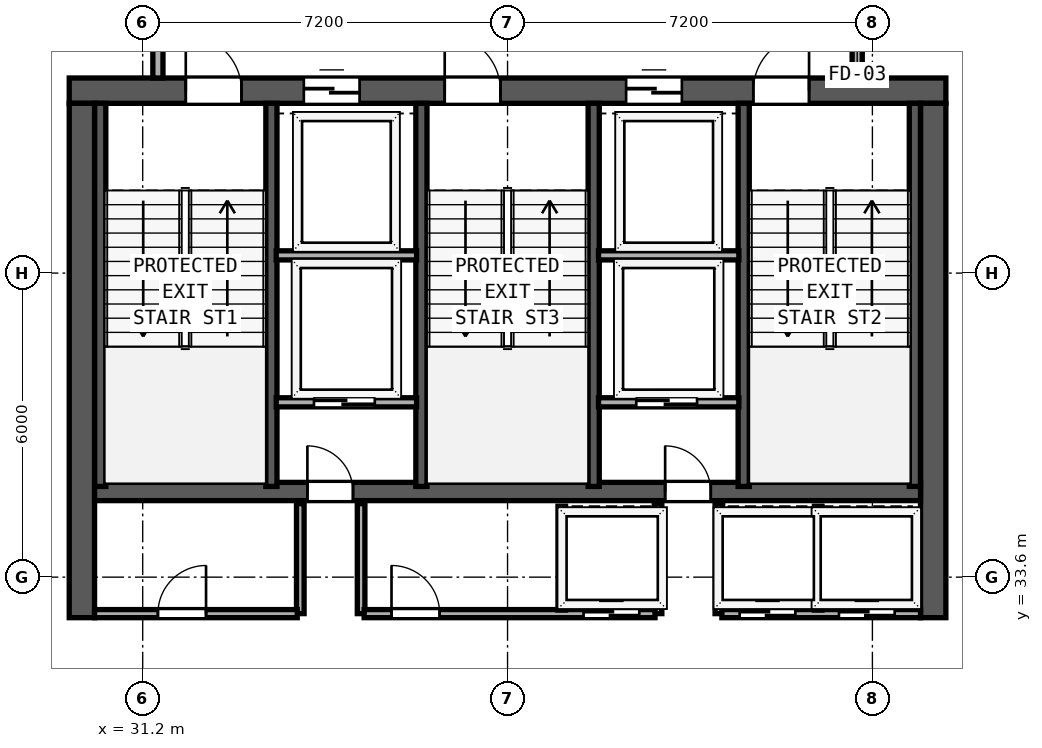
"""IFC4 building model, lengths in metres.
Left out: names, types, materials, properties, quantities, classifications, styles, units other than length and angle.
Written with IfcOpenShell. Run it as: python <this file> out.ifc"""

import sys

from ifc_helpers import new_model, si_unit, direction, frame, frame_2d, origin, place, context, subcontext, project, spatial, rectangle, extrude, element, fill, save


model = new_model("IFC4")
c1 = context("Model", 3, precision=1e-05, world=origin(), true_north=direction((0.0, 1.0)))
c2 = subcontext(c1, "Body", "Model", "MODEL_VIEW")
j1 = project(units=[si_unit("LENGTHUNIT", "METRE"), si_unit("PLANEANGLEUNIT", "RADIAN")], contexts=[c1])
p1 = place(None, origin())
s1 = spatial("IfcSite", under=j1, at=p1, CompositionType="ELEMENT")
p2 = place(p1, origin())
s2 = spatial("IfcBuilding", under=s1, at=p2, CompositionType="ELEMENT")
p3 = place(p2, frame((0.0, 0.0, 309.5)))
s3 = spatial("IfcBuildingStorey", under=s2, at=p3, CompositionType="ELEMENT", Elevation=309.5)
p4 = place(p3, frame((29.75, 43.2, 0.0), z_axis=(0.0, 0.0, 1.0), x_axis=(1.0, 0.0, 0.0)))
e1 = element("IfcWall", 1, at=p4, inside=s3, PredefinedType="SHEAR", context=c2, shape_type="SweptSolid", body=[
    extrude(rectangle(XDim=17.3, YDim=0.5, at=frame_2d((8.65, 0.0))), origin(), (0.0, 0.0, 1.0), 3.66),
])
p5 = place(p4, frame((2.3, 0.0, 0.0)))
e2 = element("IfcOpeningElement", 2, at=p5, cuts=e1, PredefinedType="OPENING", context=c2, shape_type="SweptSolid", body=[
    extrude(rectangle(XDim=1.1, YDim=2.15, at=frame_2d((0.55, 1.075))), frame((0.0, 0.26, 0.0), z_axis=(0.0, -1.0, 0.0), x_axis=(1.0, 0.0, 0.0)), (0.0, 0.0, 1.0), 0.52),
])
p6 = place(p4, frame((7.41, 0.0, 0.0)))
e3 = element("IfcOpeningElement", 3, at=p6, cuts=e1, PredefinedType="OPENING", context=c2, shape_type="SweptSolid", body=[
    extrude(rectangle(XDim=1.1, YDim=2.15, at=frame_2d((0.55, 1.075))), frame((0.0, 0.26, 0.0), z_axis=(0.0, -1.0, 0.0), x_axis=(1.0, 0.0, 0.0)), (0.0, 0.0, 1.0), 0.52),
])
p7 = place(p4, frame((13.5, 0.0, 0.0)))
e4 = element("IfcOpeningElement", 4, at=p7, cuts=e1, PredefinedType="OPENING", context=c2, shape_type="SweptSolid", body=[
    extrude(rectangle(XDim=1.1, YDim=2.15, at=frame_2d((0.55, 1.075))), frame((0.0, 0.26, 0.0), z_axis=(0.0, -1.0, 0.0), x_axis=(1.0, 0.0, 0.0)), (0.0, 0.0, 1.0), 0.52),
])
p8 = place(p4, frame((4.63, 0.0, 0.0)))
e5 = element("IfcOpeningElement", 5, at=p8, cuts=e1, PredefinedType="OPENING", context=c2, shape_type="SweptSolid", body=[
    extrude(rectangle(XDim=1.1, YDim=2.2, at=frame_2d((0.55, 1.1))), frame((0.0, 0.26, 0.0), z_axis=(0.0, -1.0, 0.0), x_axis=(1.0, 0.0, 0.0)), (0.0, 0.0, 1.0), 0.52),
])
p9 = place(p4, frame((10.99, 0.0, 0.0)))
e6 = element("IfcOpeningElement", 6, at=p9, cuts=e1, PredefinedType="OPENING", context=c2, shape_type="SweptSolid", body=[
    extrude(rectangle(XDim=1.1, YDim=2.2, at=frame_2d((0.55, 1.1))), frame((0.0, 0.26, 0.0), z_axis=(0.0, -1.0, 0.0), x_axis=(1.0, 0.0, 0.0)), (0.0, 0.0, 1.0), 0.52),
])
for number, where, z_axis, x_axis in (
    (7, (30.0, 32.8, 0.0), (0.0, 0.0, 1.0), (0.0, 1.0, 0.0)),
    (8, (46.8, 32.8, 0.0), (0.0, 0.0, 1.0), (0.0, 1.0, 0.0)),
):
    element("IfcWall", number, at=place(p3, frame(where, z_axis=z_axis, x_axis=x_axis)), inside=s3, PredefinedType="SHEAR", context=c2, shape_type="SweptSolid", body=[
        extrude(rectangle(XDim=10.15, YDim=0.5, at=frame_2d((5.075, 0.0))), origin(), (0.0, 0.0, 1.0), 3.66),
    ])
p10 = place(p3, frame((30.25, 35.29, 0.0), z_axis=(0.0, 0.0, 1.0), x_axis=(1.0, 0.0, 0.0)))
e9 = element("IfcWall", 9, at=p10, inside=s3, PredefinedType="SHEAR", context=c2, shape_type="SweptSolid", body=[
    extrude(rectangle(XDim=16.3, YDim=0.36, at=frame_2d((8.15, 0.0))), origin(), (0.0, 0.0, 1.0), 3.66),
])
p11 = place(p10, frame((5.1, 0.0, 0.0), z_axis=(0.0, 0.0, 1.0), x_axis=(-1.0, 0.0, 0.0)))
e10 = element("IfcOpeningElement", 10, at=p11, cuts=e9, PredefinedType="OPENING", context=c2, shape_type="SweptSolid", body=[
    extrude(rectangle(XDim=0.9, YDim=2.1, at=frame_2d((0.45, 1.05))), frame((0.0, 0.19, 0.0), z_axis=(0.0, -1.0, 0.0), x_axis=(1.0, 0.0, 0.0)), (0.0, 0.0, 1.0), 0.38),
])
p12 = place(p10, frame((12.16, 0.0, 0.0), z_axis=(0.0, 0.0, 1.0), x_axis=(-1.0, 0.0, 0.0)))
e11 = element("IfcOpeningElement", 11, at=p12, cuts=e9, PredefinedType="OPENING", context=c2, shape_type="SweptSolid", body=[
    extrude(rectangle(XDim=0.9, YDim=2.1, at=frame_2d((0.45, 1.05))), frame((0.0, 0.19, 0.0), z_axis=(0.0, -1.0, 0.0), x_axis=(1.0, 0.0, 0.0)), (0.0, 0.0, 1.0), 0.38),
])
for number, where, z_axis, x_axis in (
    (12, (30.362, 35.39, 0.0), (0.0, 0.0, 1.0), (0.0, 1.0, 0.0)),
    (13, (33.74, 35.39, 0.0), (0.0, 0.0, 1.0), (0.0, 1.0, 0.0)),
    (14, (36.7, 35.39, 0.0), (0.0, 0.0, 1.0), (0.0, 1.0, 0.0)),
    (15, (40.1, 35.39, 0.0), (0.0, 0.0, 1.0), (0.0, 1.0, 0.0)),
    (16, (43.06, 35.39, 0.0), (0.0, 0.0, 1.0), (0.0, 1.0, 0.0)),
    (17, (46.438, 35.39, 0.0), (0.0, 0.0, 1.0), (0.0, 1.0, 0.0)),
):
    element("IfcWall", number, at=place(p3, frame(where, z_axis=z_axis, x_axis=x_axis)), inside=s3, PredefinedType="SHEAR", context=c2, shape_type="SweptSolid", body=[
        extrude(rectangle(XDim=7.56, YDim=0.22, at=frame_2d((3.78, 0.0))), origin(), (0.0, 0.0, 1.0), 3.66),
    ])
p13 = place(p3, frame((31.5, 43.45, 0.0), z_axis=(0.0, 0.0, 1.0), x_axis=(0.0, 1.0, 0.0)))
e18 = element("IfcWall", 18, at=p13, inside=s3, PredefinedType="SOLIDWALL", context=c2, shape_type="SweptSolid", body=[
    extrude(rectangle(XDim=2.445, YDim=0.2, at=frame_2d((1.223, 0.0))), origin(), (0.0, 0.0, 1.0), 3.66),
])
p14 = place(p13, frame((1.8, 0.0, 0.0), z_axis=(0.0, 0.0, 1.0), x_axis=(-1.0, 0.0, 0.0)))
e19 = element("IfcOpeningElement", 19, at=p14, cuts=e18, PredefinedType="OPENING", context=c2, shape_type="SweptSolid", body=[
    extrude(rectangle(XDim=1.1, YDim=2.15, at=frame_2d((0.55, 1.075))), frame((0.0, 0.11, 0.0), z_axis=(0.0, -1.0, 0.0), x_axis=(1.0, 0.0, 0.0)), (0.0, 0.0, 1.0), 0.22),
])
p15 = place(p3, frame((45.3, 43.45, 0.0), z_axis=(0.0, 0.0, 1.0), x_axis=(0.0, 1.0, 0.0)))
e20 = element("IfcWall", 20, at=p15, inside=s3, PredefinedType="SOLIDWALL", context=c2, shape_type="SweptSolid", body=[
    extrude(rectangle(XDim=2.445, YDim=0.2, at=frame_2d((1.223, 0.0))), origin(), (0.0, 0.0, 1.0), 3.66),
])
p16 = place(p15, frame((0.7, 0.0, 0.0)))
e21 = element("IfcOpeningElement", 21, at=p16, cuts=e20, PredefinedType="OPENING", context=c2, shape_type="SweptSolid", body=[
    extrude(rectangle(XDim=1.1, YDim=2.15, at=frame_2d((0.55, 1.075))), frame((0.0, 0.11, 0.0), z_axis=(0.0, -1.0, 0.0), x_axis=(1.0, 0.0, 0.0)), (0.0, 0.0, 1.0), 0.22),
])
for number, where, z_axis, x_axis in (
    (22, (33.835, 39.95, 0.0), (0.0, 0.0, 1.0), (1.0, 0.0, 0.0)),
    (23, (40.195, 39.95, 0.0), (0.0, 0.0, 1.0), (1.0, 0.0, 0.0)),
):
    element("IfcWall", number, at=place(p3, frame(where, z_axis=z_axis, x_axis=x_axis)), inside=s3, PredefinedType="SOLIDWALL", context=c2, shape_type="SweptSolid", body=[
        extrude(rectangle(XDim=2.77, YDim=0.18, at=frame_2d((1.385, 0.0))), origin(), (0.0, 0.0, 1.0), 3.66),
    ])
p17 = place(p3, frame((33.835, 37.05, 0.0), z_axis=(0.0, 0.0, 1.0), x_axis=(1.0, 0.0, 0.0)))
e24 = element("IfcWall", 24, at=p17, inside=s3, PredefinedType="SOLIDWALL", context=c2, shape_type="SweptSolid", body=[
    extrude(rectangle(XDim=2.77, YDim=0.18, at=frame_2d((1.385, 0.0))), origin(), (0.0, 0.0, 1.0), 3.66),
])
p18 = place(p17, frame((1.945, 0.0, 0.0), z_axis=(0.0, 0.0, 1.0), x_axis=(-1.0, 0.0, 0.0)))
e25 = element("IfcOpeningElement", 25, at=p18, cuts=e24, PredefinedType="OPENING", context=c2, shape_type="SweptSolid", body=[
    extrude(rectangle(XDim=1.2, YDim=2.2, at=frame_2d((0.6, 1.1))), frame((0.0, 0.1, 0.0), z_axis=(0.0, -1.0, 0.0), x_axis=(1.0, 0.0, 0.0)), (0.0, 0.0, 1.0), 0.2),
])
for number, where, z_axis, x_axis in (
    (26, (34.31, 32.88, 0.0), (0.0, 0.0, 1.0), (0.0, 1.0, 0.0)),
    (27, (35.51, 32.88, 0.0), (0.0, 0.0, 1.0), (0.0, 1.0, 0.0)),
):
    element("IfcWall", number, at=place(p3, frame(where, z_axis=z_axis, x_axis=x_axis)), inside=s3, PredefinedType="SOLIDWALL", context=c2, shape_type="SweptSolid", body=[
        extrude(rectangle(XDim=2.17, YDim=0.15, at=frame_2d((1.085, 0.0))), origin(), (0.0, 0.0, 1.0), 3.66),
    ])
p19 = place(p3, frame((40.195, 37.05, 0.0), z_axis=(0.0, 0.0, 1.0), x_axis=(1.0, 0.0, 0.0)))
e28 = element("IfcWall", 28, at=p19, inside=s3, PredefinedType="SOLIDWALL", context=c2, shape_type="SweptSolid", body=[
    extrude(rectangle(XDim=2.77, YDim=0.18, at=frame_2d((1.385, 0.0))), origin(), (0.0, 0.0, 1.0), 3.66),
])
p20 = place(p19, frame((1.945, 0.0, 0.0), z_axis=(0.0, 0.0, 1.0), x_axis=(-1.0, 0.0, 0.0)))
e29 = element("IfcOpeningElement", 29, at=p20, cuts=e28, PredefinedType="OPENING", context=c2, shape_type="SweptSolid", body=[
    extrude(rectangle(XDim=1.2, YDim=2.2, at=frame_2d((0.6, 1.1))), frame((0.0, 0.1, 0.0), z_axis=(0.0, -1.0, 0.0), x_axis=(1.0, 0.0, 0.0)), (0.0, 0.0, 1.0), 0.2),
])
for number, where, z_axis, x_axis in (
    (30, (41.37, 32.88, 0.0), (0.0, 0.0, 1.0), (0.0, 1.0, 0.0)),
    (31, (42.57, 32.88, 0.0), (0.0, 0.0, 1.0), (0.0, 1.0, 0.0)),
):
    element("IfcWall", number, at=place(p3, frame(where, z_axis=z_axis, x_axis=x_axis)), inside=s3, PredefinedType="SOLIDWALL", context=c2, shape_type="SweptSolid", body=[
        extrude(rectangle(XDim=2.17, YDim=0.15, at=frame_2d((1.085, 0.0))), origin(), (0.0, 0.0, 1.0), 3.66),
    ])
p21 = place(p3, frame((30.25, 32.88, 0.0), z_axis=(0.0, 0.0, 1.0), x_axis=(1.0, 0.0, 0.0)))
e32 = element("IfcWall", 32, at=p21, inside=s3, PredefinedType="SOLIDWALL", context=c2, shape_type="SweptSolid", body=[
    extrude(rectangle(XDim=4.0, YDim=0.16, at=frame_2d((2.0, 0.0))), origin(), (0.0, 0.0, 1.0), 3.66),
])
p22 = place(p21, frame((2.2, 0.0, 0.0), z_axis=(0.0, 0.0, 1.0), x_axis=(-1.0, 0.0, 0.0)))
e33 = element("IfcOpeningElement", 33, at=p22, cuts=e32, PredefinedType="OPENING", context=c2, shape_type="SweptSolid", body=[
    extrude(rectangle(XDim=0.95, YDim=2.12, at=frame_2d((0.475, 1.06))), frame((0.0, 0.09, 0.0), z_axis=(0.0, -1.0, 0.0), x_axis=(1.0, 0.0, 0.0)), (0.0, 0.0, 1.0), 0.18),
])
p23 = place(p3, frame((35.57, 32.88, 0.0), z_axis=(0.0, 0.0, 1.0), x_axis=(1.0, 0.0, 0.0)))
e34 = element("IfcWall", 34, at=p23, inside=s3, PredefinedType="SOLIDWALL", context=c2, shape_type="SweptSolid", body=[
    extrude(rectangle(XDim=5.74, YDim=0.16, at=frame_2d((2.87, 0.0))), origin(), (0.0, 0.0, 1.0), 3.66),
])
p24 = place(p23, frame((1.49, 0.0, 0.0), z_axis=(0.0, 0.0, 1.0), x_axis=(-1.0, 0.0, 0.0)))
e35 = element("IfcOpeningElement", 35, at=p24, cuts=e34, PredefinedType="OPENING", context=c2, shape_type="SweptSolid", body=[
    extrude(rectangle(XDim=0.95, YDim=2.12, at=frame_2d((0.475, 1.06))), frame((0.0, 0.09, 0.0), z_axis=(0.0, -1.0, 0.0), x_axis=(1.0, 0.0, 0.0)), (0.0, 0.0, 1.0), 0.18),
])
p25 = place(p23, frame((5.43, 0.0, 0.0), z_axis=(0.0, 0.0, 1.0), x_axis=(-1.0, 0.0, 0.0)))
e36 = element("IfcOpeningElement", 36, at=p25, cuts=e34, PredefinedType="OPENING", context=c2, shape_type="SweptSolid", body=[
    extrude(rectangle(XDim=1.1, YDim=2.2, at=frame_2d((0.55, 1.1))), frame((0.0, 0.09, 0.0), z_axis=(0.0, -1.0, 0.0), x_axis=(1.0, 0.0, 0.0)), (0.0, 0.0, 1.0), 0.18),
])
p26 = place(p3, frame((42.63, 32.88, 0.0), z_axis=(0.0, 0.0, 1.0), x_axis=(1.0, 0.0, 0.0)))
e37 = element("IfcWall", 37, at=p26, inside=s3, PredefinedType="SOLIDWALL", context=c2, shape_type="SweptSolid", body=[
    extrude(rectangle(XDim=3.92, YDim=0.16, at=frame_2d((1.96, 0.0))), origin(), (0.0, 0.0, 1.0), 3.66),
])
p27 = place(p26, frame((1.45, 0.0, 0.0), z_axis=(0.0, 0.0, 1.0), x_axis=(-1.0, 0.0, 0.0)))
e38 = element("IfcOpeningElement", 38, at=p27, cuts=e37, PredefinedType="OPENING", context=c2, shape_type="SweptSolid", body=[
    extrude(rectangle(XDim=1.1, YDim=2.2, at=frame_2d((0.55, 1.1))), frame((0.0, 0.09, 0.0), z_axis=(0.0, -1.0, 0.0), x_axis=(1.0, 0.0, 0.0)), (0.0, 0.0, 1.0), 0.18),
])
p28 = place(p26, frame((3.41, 0.0, 0.0), z_axis=(0.0, 0.0, 1.0), x_axis=(-1.0, 0.0, 0.0)))
e39 = element("IfcOpeningElement", 39, at=p28, cuts=e37, PredefinedType="OPENING", context=c2, shape_type="SweptSolid", body=[
    extrude(rectangle(XDim=1.1, YDim=2.2, at=frame_2d((0.55, 1.1))), frame((0.0, 0.09, 0.0), z_axis=(0.0, -1.0, 0.0), x_axis=(1.0, 0.0, 0.0)), (0.0, 0.0, 1.0), 0.18),
])
for number, where, z_axis, x_axis in (
    (40, (39.47, 32.95, 0.0), (0.0, 0.0, 1.0), (0.0, 1.0, 0.0)),
    (41, (44.53, 32.95, 0.0), (0.0, 0.0, 1.0), (0.0, 1.0, 0.0)),
):
    element("IfcWall", number, at=place(p3, frame(where, z_axis=z_axis, x_axis=x_axis)), inside=s3, PredefinedType="SOLIDWALL", context=c2, shape_type="SweptSolid", body=[
        extrude(rectangle(XDim=2.05, YDim=0.15, at=frame_2d((1.025, 0.0))), origin(), (0.0, 0.0, 1.0), 3.66),
    ])
p29 = place(p5, origin())
e42 = element("IfcDoor", 42, at=p29, inside=s3, OperationType="SINGLE_SWING_LEFT", PredefinedType="DOOR", context=c2, shape_type="SweptSolid", body=[
    extrude(rectangle(XDim=1.1, YDim=2.15, at=frame_2d((0.55, 1.075))), frame((0.0, 0.185, 0.0), z_axis=(0.0, -1.0, 0.0), x_axis=(1.0, 0.0, 0.0)), (0.0, 0.0, 1.0), 0.05),
])
fill(e2, e42)
p30 = place(p6, origin())
e43 = element("IfcDoor", 43, at=p30, inside=s3, OperationType="SINGLE_SWING_LEFT", PredefinedType="DOOR", context=c2, shape_type="SweptSolid", body=[
    extrude(rectangle(XDim=1.1, YDim=2.15, at=frame_2d((0.55, 1.075))), frame((0.0, 0.185, 0.0), z_axis=(0.0, -1.0, 0.0), x_axis=(1.0, 0.0, 0.0)), (0.0, 0.0, 1.0), 0.05),
])
fill(e3, e43)
p31 = place(p7, origin())
e44 = element("IfcDoor", 44, at=p31, inside=s3, OperationType="SINGLE_SWING_RIGHT", PredefinedType="DOOR", context=c2, shape_type="SweptSolid", body=[
    extrude(rectangle(XDim=1.1, YDim=2.15, at=frame_2d((0.55, 1.075))), frame((0.0, 0.185, 0.0), z_axis=(0.0, -1.0, 0.0), x_axis=(1.0, 0.0, 0.0)), (0.0, 0.0, 1.0), 0.05),
])
fill(e4, e44)
p32 = place(p8, origin())
e45 = element("IfcDoor", 45, at=p32, inside=s3, OperationType="SLIDING_TO_LEFT", PredefinedType="DOOR", context=c2, shape_type="SweptSolid", body=[
    extrude(rectangle(XDim=1.1, YDim=2.2, at=frame_2d((0.55, 1.1))), frame((0.0, 0.185, 0.0), z_axis=(0.0, -1.0, 0.0), x_axis=(1.0, 0.0, 0.0)), (0.0, 0.0, 1.0), 0.05),
])
fill(e5, e45)
p33 = place(p9, origin())
e46 = element("IfcDoor", 46, at=p33, inside=s3, OperationType="SLIDING_TO_LEFT", PredefinedType="DOOR", context=c2, shape_type="SweptSolid", body=[
    extrude(rectangle(XDim=1.1, YDim=2.2, at=frame_2d((0.55, 1.1))), frame((0.0, 0.185, 0.0), z_axis=(0.0, -1.0, 0.0), x_axis=(1.0, 0.0, 0.0)), (0.0, 0.0, 1.0), 0.05),
])
fill(e6, e46)
p34 = place(p18, origin())
e47 = element("IfcDoor", 47, at=p34, inside=s3, OperationType="SLIDING_TO_RIGHT", PredefinedType="DOOR", context=c2, shape_type="SweptSolid", body=[
    extrude(rectangle(XDim=1.2, YDim=2.2, at=frame_2d((0.6, 1.1))), frame((0.0, 0.025, 0.0), z_axis=(0.0, -1.0, 0.0), x_axis=(1.0, 0.0, 0.0)), (0.0, 0.0, 1.0), 0.05),
])
fill(e25, e47)
p35 = place(p11, origin())
e48 = element("IfcDoor", 48, at=p35, inside=s3, OperationType="SINGLE_SWING_RIGHT", PredefinedType="DOOR", context=c2, shape_type="SweptSolid", body=[
    extrude(rectangle(XDim=0.9, YDim=2.1, at=frame_2d((0.45, 1.05))), frame((0.0, 0.025, 0.0), z_axis=(0.0, -1.0, 0.0), x_axis=(1.0, 0.0, 0.0)), (0.0, 0.0, 1.0), 0.05),
])
fill(e10, e48)
p36 = place(p20, origin())
e49 = element("IfcDoor", 49, at=p36, inside=s3, OperationType="SLIDING_TO_RIGHT", PredefinedType="DOOR", context=c2, shape_type="SweptSolid", body=[
    extrude(rectangle(XDim=1.2, YDim=2.2, at=frame_2d((0.6, 1.1))), frame((0.0, 0.025, 0.0), z_axis=(0.0, -1.0, 0.0), x_axis=(1.0, 0.0, 0.0)), (0.0, 0.0, 1.0), 0.05),
])
fill(e29, e49)
p37 = place(p12, origin())
e50 = element("IfcDoor", 50, at=p37, inside=s3, OperationType="SINGLE_SWING_RIGHT", PredefinedType="DOOR", context=c2, shape_type="SweptSolid", body=[
    extrude(rectangle(XDim=0.9, YDim=2.1, at=frame_2d((0.45, 1.05))), frame((0.0, 0.025, 0.0), z_axis=(0.0, -1.0, 0.0), x_axis=(1.0, 0.0, 0.0)), (0.0, 0.0, 1.0), 0.05),
])
fill(e11, e50)
p38 = place(p22, origin())
e51 = element("IfcDoor", 51, at=p38, inside=s3, OperationType="SINGLE_SWING_LEFT", PredefinedType="DOOR", context=c2, shape_type="SweptSolid", body=[
    extrude(rectangle(XDim=0.95, YDim=2.12, at=frame_2d((0.475, 1.06))), frame((0.0, 0.025, 0.0), z_axis=(0.0, -1.0, 0.0), x_axis=(1.0, 0.0, 0.0)), (0.0, 0.0, 1.0), 0.05),
])
fill(e33, e51)
p39 = place(p24, origin())
e52 = element("IfcDoor", 52, at=p39, inside=s3, OperationType="SINGLE_SWING_RIGHT", PredefinedType="DOOR", context=c2, shape_type="SweptSolid", body=[
    extrude(rectangle(XDim=0.95, YDim=2.12, at=frame_2d((0.475, 1.06))), frame((0.0, 0.025, 0.0), z_axis=(0.0, -1.0, 0.0), x_axis=(1.0, 0.0, 0.0)), (0.0, 0.0, 1.0), 0.05),
])
fill(e35, e52)
p40 = place(p25, origin())
e53 = element("IfcDoor", 53, at=p40, inside=s3, OperationType="SLIDING_TO_RIGHT", PredefinedType="DOOR", context=c2, shape_type="SweptSolid", body=[
    extrude(rectangle(XDim=1.1, YDim=2.2, at=frame_2d((0.55, 1.1))), frame((0.0, 0.025, 0.0), z_axis=(0.0, -1.0, 0.0), x_axis=(1.0, 0.0, 0.0)), (0.0, 0.0, 1.0), 0.05),
])
fill(e36, e53)
p41 = place(p27, origin())
e54 = element("IfcDoor", 54, at=p41, inside=s3, OperationType="SLIDING_TO_RIGHT", PredefinedType="DOOR", context=c2, shape_type="SweptSolid", body=[
    extrude(rectangle(XDim=1.1, YDim=2.2, at=frame_2d((0.55, 1.1))), frame((0.0, 0.025, 0.0), z_axis=(0.0, -1.0, 0.0), x_axis=(1.0, 0.0, 0.0)), (0.0, 0.0, 1.0), 0.05),
])
fill(e38, e54)
p42 = place(p28, origin())
e55 = element("IfcDoor", 55, at=p42, inside=s3, OperationType="SLIDING_TO_RIGHT", PredefinedType="DOOR", context=c2, shape_type="SweptSolid", body=[
    extrude(rectangle(XDim=1.1, YDim=2.2, at=frame_2d((0.55, 1.1))), frame((0.0, 0.025, 0.0), z_axis=(0.0, -1.0, 0.0), x_axis=(1.0, 0.0, 0.0)), (0.0, 0.0, 1.0), 0.05),
])
fill(e39, e55)
save(model, sys.argv[1])
